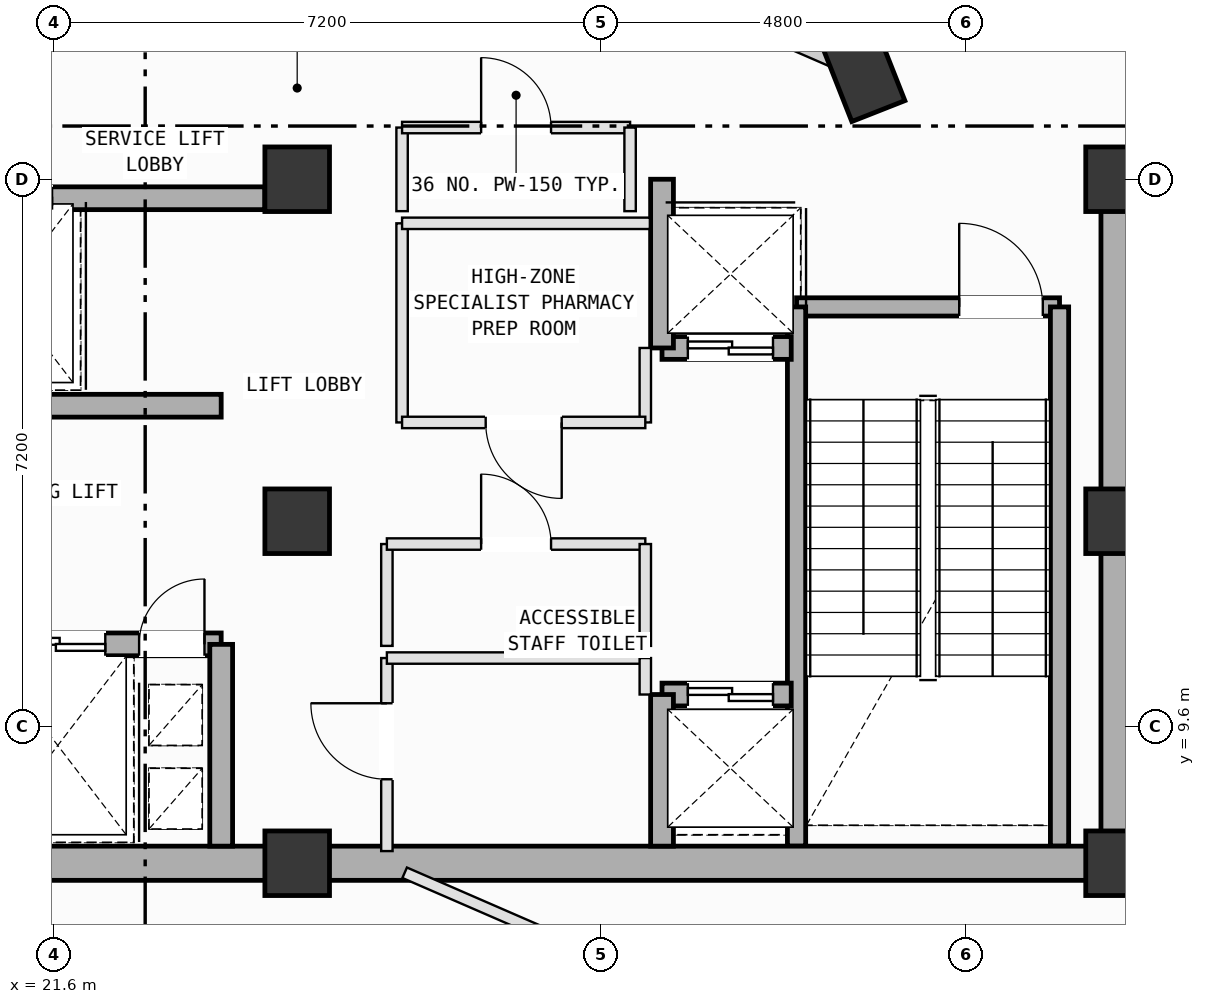
"""IFC4 building model, lengths in metres.
Left out: names, types, materials, properties, quantities, classifications, styles, units other than length and angle.
Written with IfcOpenShell. Run it as: python <this file> out.ifc"""

import sys

from ifc_helpers import new_model, si_unit, direction, frame, frame_2d, origin, origin_2d, place, context, subcontext, project, spatial, rectangle, extrude, element, fill, save


model = new_model("IFC4")
c1 = context("Model", 3, precision=1e-05, world=origin(), true_north=direction((0.0, 1.0)))
c2 = subcontext(c1, "Body", "Model", "MODEL_VIEW")
j1 = project(units=[si_unit("LENGTHUNIT", "METRE"), si_unit("PLANEANGLEUNIT", "RADIAN")], contexts=[c1])
p1 = place(None, origin())
s1 = spatial("IfcSite", under=j1, at=p1, CompositionType="ELEMENT")
p2 = place(p1, origin())
s2 = spatial("IfcBuilding", under=s1, at=p2, CompositionType="ELEMENT")
p3 = place(p2, frame((0.0, 0.0, 333.4)))
s3 = spatial("IfcBuildingStorey", under=s2, at=p3, CompositionType="ELEMENT", Elevation=333.4)
for number, where, z_axis, x_axis in (
    (1, (24.8, 7.8, 0.0), (0.0, 0.0, 1.0), (1.0, 0.0, 0.0)),
    (2, (24.8, 12.3, 0.0), (0.0, 0.0, 1.0), (1.0, 0.0, 0.0)),
    (3, (24.8, 16.8, 0.0), (0.0, 0.0, 1.0), (1.0, 0.0, 0.0)),
    (4, (35.6, 7.8, 0.0), (0.0, 0.0, 1.0), (1.0, 0.0, 0.0)),
    (5, (35.6, 12.3, 0.0), (0.0, 0.0, 1.0), (1.0, 0.0, 0.0)),
    (6, (35.6, 16.8, 0.0), (0.0, 0.0, 1.0), (1.0, 0.0, 0.0)),
):
    element("IfcColumn", number, at=place(p3, frame(where, z_axis=z_axis, x_axis=x_axis)), inside=s3, PredefinedType="COLUMN", context=c2, shape_type="SweptSolid", body=[
        extrude(rectangle(XDim=0.85, YDim=0.85, at=origin_2d()), origin(), (0.0, 0.0, 1.0), 4.8),
    ])
p4 = place(p3, frame((32.226, 18.255, 0.002), z_axis=(0.0, 0.0, 1.0), x_axis=(-0.366501226724, 0.930417567982, 0.0)))
e7 = element("IfcColumn", 7, at=p4, inside=s3, PredefinedType="COLUMN", context=c2, shape_type="SweptSolid", body=[
    extrude(rectangle(XDim=1.2, YDim=0.75, at=origin_2d()), origin(), (0.0, 0.0, 1.0), 4.796),
])
p5 = place(p3, frame((25.484, 21.187, 0.0), z_axis=(0.0, 0.0, 1.0), x_axis=(0.917060568388, -0.398747932794, 0.0)))
e8 = element("IfcWall", 8, at=p5, inside=s3, PredefinedType="SOLIDWALL", context=c2, shape_type="SweptSolid", body=[
    extrude(rectangle(XDim=6.955, YDim=0.28, at=frame_2d((3.478, 0.0))), origin(), (0.0, 0.0, 1.0), 3.485),
])
p6 = place(p3, frame((31.37, 15.12, 0.0), z_axis=(0.0, 0.0, 1.0), x_axis=(1.0, 0.0, 0.0)))
e9 = element("IfcWall", 9, at=p6, inside=s3, PredefinedType="SOLIDWALL", context=c2, shape_type="SweptSolid", body=[
    extrude(rectangle(XDim=3.46, YDim=0.24, at=frame_2d((1.73, 0.0))), origin(), (0.0, 0.0, 1.0), 4.5),
])
p7 = place(p6, frame((2.14, 0.0, 0.0)))
e10 = element("IfcOpeningElement", 10, at=p7, cuts=e9, PredefinedType="OPENING", context=c2, shape_type="SweptSolid", body=[
    extrude(rectangle(XDim=1.1, YDim=2.15, at=frame_2d((0.55, 1.075))), frame((0.0, 0.13, 0.0), z_axis=(0.0, -1.0, 0.0), x_axis=(1.0, 0.0, 0.0)), (0.0, 0.0, 1.0), 0.26),
])
for number, where, z_axis, x_axis in (
    (11, (34.83, 15.12, 0.0), (0.0, 0.0, 1.0), (0.0, -1.0, 0.0)),
    (12, (31.37, 8.025, 0.0), (0.0, 0.0, 1.0), (0.0, 1.0, 0.0)),
):
    element("IfcWall", number, at=place(p3, frame(where, z_axis=z_axis, x_axis=x_axis)), inside=s3, PredefinedType="SOLIDWALL", context=c2, shape_type="SweptSolid", body=[
        extrude(rectangle(XDim=7.095, YDim=0.24, at=frame_2d((3.548, 0.0))), origin(), (0.0, 0.0, 1.0), 4.5),
    ])
for number, where, z_axis, x_axis in (
    (13, (14.0, 7.8, 0.0), (0.0, 0.0, 1.0), (1.0, 0.0, 0.0)),
    (14, (24.8, 7.8, 0.0), (0.0, 0.0, 1.0), (1.0, 0.0, 0.0)),
):
    element("IfcWall", number, at=place(p3, frame(where, z_axis=z_axis, x_axis=x_axis)), inside=s3, PredefinedType="SHEAR", context=c2, shape_type="SweptSolid", body=[
        extrude(rectangle(XDim=10.8, YDim=0.45, at=frame_2d((5.4, 0.0))), origin(), (0.0, 0.0, 1.0), 4.5),
    ])
p8 = place(p3, frame((35.6, 7.8, 0.0), z_axis=(0.0, 0.0, 1.0), x_axis=(0.0, 1.0, 0.0)))
e15 = element("IfcWall", 15, at=p8, inside=s3, PredefinedType="SHEAR", context=c2, shape_type="SweptSolid", body=[
    extrude(rectangle(XDim=9.0, YDim=0.45, at=frame_2d((4.5, 0.0))), origin(), (0.0, 0.0, 1.0), 4.5),
])
p9 = place(p3, frame((19.85, 16.55, 0.0), z_axis=(0.0, 0.0, 1.0), x_axis=(1.0, 0.0, 0.0)))
e16 = element("IfcWall", 16, at=p9, inside=s3, PredefinedType="SOLIDWALL", context=c2, shape_type="SweptSolid", body=[
    extrude(rectangle(XDim=4.525, YDim=0.3, at=frame_2d((2.262, 0.0))), origin(), (0.0, 0.0, 1.0), 4.5),
])
p10 = place(p9, frame((0.475, 0.0, 0.0)))
e17 = element("IfcOpeningElement", 17, at=p10, cuts=e16, PredefinedType="OPENING", context=c2, shape_type="SweptSolid", body=[
    extrude(rectangle(XDim=1.25, YDim=2.18, at=frame_2d((0.625, 1.09))), frame((0.0, 0.16, 0.0), z_axis=(0.0, -1.0, 0.0), x_axis=(1.0, 0.0, 0.0)), (0.0, 0.0, 1.0), 0.32),
])
p11 = place(p3, frame((18.5, 10.68, 0.0), z_axis=(0.0, 0.0, 1.0), x_axis=(1.0, 0.0, 0.0)))
e18 = element("IfcWall", 18, at=p11, inside=s3, PredefinedType="SOLIDWALL", context=c2, shape_type="SweptSolid", body=[
    extrude(rectangle(XDim=5.3, YDim=0.3, at=frame_2d((2.65, 0.0))), origin(), (0.0, 0.0, 1.0), 4.5),
])
p12 = place(p11, frame((4.22, 0.0, 0.0)))
e19 = element("IfcOpeningElement", 19, at=p12, cuts=e18, PredefinedType="OPENING", context=c2, shape_type="SweptSolid", body=[
    extrude(rectangle(XDim=0.86, YDim=2.06, at=frame_2d((0.43, 1.03))), frame((0.0, 0.16, 0.0), z_axis=(0.0, -1.0, 0.0), x_axis=(1.0, 0.0, 0.0)), (0.0, 0.0, 1.0), 0.32),
])
p13 = place(p11, frame((0.425, 0.0, 0.0)))
e20 = element("IfcOpeningElement", 20, at=p13, cuts=e18, PredefinedType="OPENING", context=c2, shape_type="SweptSolid", body=[
    extrude(rectangle(XDim=1.25, YDim=2.18, at=frame_2d((0.625, 1.09))), frame((0.0, 0.16, 0.0), z_axis=(0.0, -1.0, 0.0), x_axis=(1.0, 0.0, 0.0)), (0.0, 0.0, 1.0), 0.32),
])
p14 = place(p11, frame((2.525, 0.0, 0.0)))
e21 = element("IfcOpeningElement", 21, at=p14, cuts=e18, PredefinedType="OPENING", context=c2, shape_type="SweptSolid", body=[
    extrude(rectangle(XDim=1.25, YDim=2.18, at=frame_2d((0.625, 1.09))), frame((0.0, 0.16, 0.0), z_axis=(0.0, -1.0, 0.0), x_axis=(1.0, 0.0, 0.0)), (0.0, 0.0, 1.0), 0.32),
])
p15 = place(p3, frame((18.5, 13.82, 0.0), z_axis=(0.0, 0.0, 1.0), x_axis=(1.0, 0.0, 0.0)))
e22 = element("IfcWall", 22, at=p15, inside=s3, PredefinedType="SOLIDWALL", context=c2, shape_type="SweptSolid", body=[
    extrude(rectangle(XDim=5.3, YDim=0.3, at=frame_2d((2.65, 0.0))), origin(), (0.0, 0.0, 1.0), 4.5),
])
p16 = place(p15, frame((0.18, 0.0, 0.0)))
e23 = element("IfcOpeningElement", 23, at=p16, cuts=e22, PredefinedType="OPENING", context=c2, shape_type="SweptSolid", body=[
    extrude(rectangle(XDim=1.1, YDim=2.15, at=frame_2d((0.55, 1.075))), frame((0.0, 0.16, 0.0), z_axis=(0.0, -1.0, 0.0), x_axis=(1.0, 0.0, 0.0)), (0.0, 0.0, 1.0), 0.32),
])
p17 = place(p3, frame((23.8, 8.025, 0.0), z_axis=(0.0, 0.0, 1.0), x_axis=(0.0, 1.0, 0.0)))
e24 = element("IfcWall", 24, at=p17, inside=s3, PredefinedType="SOLIDWALL", context=c2, shape_type="SweptSolid", body=[
    extrude(rectangle(XDim=2.655, YDim=0.3, at=frame_2d((1.328, 0.0))), origin(), (0.0, 0.0, 1.0), 4.5),
])
p18 = place(p3, frame((29.6, 10.02, 0.0), z_axis=(0.0, 0.0, 1.0), x_axis=(1.0, 0.0, 0.0)))
e25 = element("IfcWall", 25, at=p18, inside=s3, PredefinedType="SOLIDWALL", context=c2, shape_type="SweptSolid", body=[
    extrude(rectangle(XDim=1.7, YDim=0.3, at=frame_2d((0.85, 0.0))), origin(), (0.0, 0.0, 1.0), 4.5),
])
p19 = place(p18, frame((0.34, 0.0, 0.0)))
e26 = element("IfcOpeningElement", 26, at=p19, cuts=e25, PredefinedType="OPENING", context=c2, shape_type="SweptSolid", body=[
    extrude(rectangle(XDim=1.12, YDim=2.15, at=frame_2d((0.56, 1.075))), frame((0.0, 0.16, 0.0), z_axis=(0.0, -1.0, 0.0), x_axis=(1.0, 0.0, 0.0)), (0.0, 0.0, 1.0), 0.32),
])
p20 = place(p3, frame((29.6, 8.025, 0.0), z_axis=(0.0, 0.0, 1.0), x_axis=(0.0, 1.0, 0.0)))
e27 = element("IfcWall", 27, at=p20, inside=s3, PredefinedType="SOLIDWALL", context=c2, shape_type="SweptSolid", body=[
    extrude(rectangle(XDim=1.995, YDim=0.3, at=frame_2d((0.998, 0.0))), origin(), (0.0, 0.0, 1.0), 4.5),
])
p21 = place(p3, frame((29.6, 14.58, 0.0), z_axis=(0.0, 0.0, 1.0), x_axis=(1.0, 0.0, 0.0)))
e28 = element("IfcWall", 28, at=p21, inside=s3, PredefinedType="SOLIDWALL", context=c2, shape_type="SweptSolid", body=[
    extrude(rectangle(XDim=1.7, YDim=0.3, at=frame_2d((0.85, 0.0))), origin(), (0.0, 0.0, 1.0), 4.5),
])
p22 = place(p21, frame((0.34, 0.0, 0.0)))
e29 = element("IfcOpeningElement", 29, at=p22, cuts=e28, PredefinedType="OPENING", context=c2, shape_type="SweptSolid", body=[
    extrude(rectangle(XDim=1.12, YDim=2.15, at=frame_2d((0.56, 1.075))), frame((0.0, 0.16, 0.0), z_axis=(0.0, -1.0, 0.0), x_axis=(1.0, 0.0, 0.0)), (0.0, 0.0, 1.0), 0.32),
])
p23 = place(p3, frame((29.6, 14.58, 0.0), z_axis=(0.0, 0.0, 1.0), x_axis=(0.0, 1.0, 0.0)))
e30 = element("IfcWall", 30, at=p23, inside=s3, PredefinedType="SOLIDWALL", context=c2, shape_type="SweptSolid", body=[
    extrude(rectangle(XDim=2.22, YDim=0.3, at=frame_2d((1.11, 0.0))), origin(), (0.0, 0.0, 1.0), 4.5),
])
p24 = place(p3, frame((25.98, 7.96, 0.0), z_axis=(0.0, 0.0, 1.0), x_axis=(0.0, 1.0, 0.0)))
e31 = element("IfcWall", 31, at=p24, inside=s3, PredefinedType="PARTITIONING", context=c2, shape_type="SweptSolid", body=[
    extrude(rectangle(XDim=2.54, YDim=0.15, at=frame_2d((1.27, 0.0))), origin(), (0.0, 0.0, 1.0), 4.5),
])
p25 = place(p24, frame((0.945, 0.0, 0.0)))
e32 = element("IfcOpeningElement", 32, at=p25, cuts=e31, PredefinedType="OPENING", context=c2, shape_type="SweptSolid", body=[
    extrude(rectangle(XDim=1.0, YDim=2.12, at=frame_2d((0.5, 1.06))), frame((0.0, 0.085, 0.0), z_axis=(0.0, -1.0, 0.0), x_axis=(1.0, 0.0, 0.0)), (0.0, 0.0, 1.0), 0.17),
])
p26 = place(p3, frame((25.98, 10.5, 0.0), z_axis=(0.0, 0.0, 1.0), x_axis=(1.0, 0.0, 0.0)))
e33 = element("IfcWall", 33, at=p26, inside=s3, PredefinedType="PARTITIONING", context=c2, shape_type="SweptSolid", body=[
    extrude(rectangle(XDim=3.4, YDim=0.15, at=frame_2d((1.7, 0.0))), origin(), (0.0, 0.0, 1.0), 4.5),
])
p27 = place(p3, frame((29.38, 10.5, 0.0), z_axis=(0.0, 0.0, 1.0), x_axis=(0.0, -1.0, 0.0)))
e34 = element("IfcWall", 34, at=p27, inside=s3, PredefinedType="PARTITIONING", context=c2, shape_type="SweptSolid", body=[
    extrude(rectangle(XDim=0.48, YDim=0.15, at=frame_2d((0.24, 0.0))), origin(), (0.0, 0.0, 1.0), 4.5),
])
p28 = place(p3, frame((25.98, 10.66, 0.0), z_axis=(0.0, 0.0, 1.0), x_axis=(0.0, 1.0, 0.0)))
e35 = element("IfcWall", 35, at=p28, inside=s3, PredefinedType="PARTITIONING", context=c2, shape_type="SweptSolid", body=[
    extrude(rectangle(XDim=1.34, YDim=0.15, at=frame_2d((0.67, 0.0))), origin(), (0.0, 0.0, 1.0), 4.5),
])
p29 = place(p3, frame((25.98, 12.0, 0.0), z_axis=(0.0, 0.0, 1.0), x_axis=(1.0, 0.0, 0.0)))
e36 = element("IfcWall", 36, at=p29, inside=s3, PredefinedType="PARTITIONING", context=c2, shape_type="SweptSolid", body=[
    extrude(rectangle(XDim=3.4, YDim=0.15, at=frame_2d((1.7, 0.0))), origin(), (0.0, 0.0, 1.0), 4.5),
])
p30 = place(p29, frame((1.24, 0.0, 0.0)))
e37 = element("IfcOpeningElement", 37, at=p30, cuts=e36, PredefinedType="OPENING", context=c2, shape_type="SweptSolid", body=[
    extrude(rectangle(XDim=0.92, YDim=2.1, at=frame_2d((0.46, 1.05))), frame((0.0, 0.085, 0.0), z_axis=(0.0, -1.0, 0.0), x_axis=(1.0, 0.0, 0.0)), (0.0, 0.0, 1.0), 0.17),
])
p31 = place(p3, frame((29.38, 12.0, 0.0), z_axis=(0.0, 0.0, 1.0), x_axis=(0.0, -1.0, 0.0)))
e38 = element("IfcWall", 38, at=p31, inside=s3, PredefinedType="PARTITIONING", context=c2, shape_type="SweptSolid", body=[
    extrude(rectangle(XDim=1.34, YDim=0.15, at=frame_2d((0.67, 0.0))), origin(), (0.0, 0.0, 1.0), 4.5),
])
p32 = place(p3, frame((26.18, 13.6, 0.0), z_axis=(0.0, 0.0, 1.0), x_axis=(0.0, 1.0, 0.0)))
e39 = element("IfcWall", 39, at=p32, inside=s3, PredefinedType="PARTITIONING", context=c2, shape_type="SweptSolid", body=[
    extrude(rectangle(XDim=2.62, YDim=0.15, at=frame_2d((1.31, 0.0))), origin(), (0.0, 0.0, 1.0), 4.5),
])
p33 = place(p3, frame((26.18, 16.22, 0.0), z_axis=(0.0, 0.0, 1.0), x_axis=(1.0, 0.0, 0.0)))
e40 = element("IfcWall", 40, at=p33, inside=s3, PredefinedType="PARTITIONING", context=c2, shape_type="SweptSolid", body=[
    extrude(rectangle(XDim=3.26, YDim=0.15, at=frame_2d((1.63, 0.0))), origin(), (0.0, 0.0, 1.0), 4.5),
])
p34 = place(p3, frame((29.38, 14.58, 0.0), z_axis=(0.0, 0.0, 1.0), x_axis=(0.0, -1.0, 0.0)))
e41 = element("IfcWall", 41, at=p34, inside=s3, PredefinedType="PARTITIONING", context=c2, shape_type="SweptSolid", body=[
    extrude(rectangle(XDim=0.98, YDim=0.15, at=frame_2d((0.49, 0.0))), origin(), (0.0, 0.0, 1.0), 4.5),
])
p35 = place(p3, frame((29.38, 13.6, 0.0), z_axis=(0.0, 0.0, 1.0), x_axis=(-1.0, 0.0, 0.0)))
e42 = element("IfcWall", 42, at=p35, inside=s3, PredefinedType="PARTITIONING", context=c2, shape_type="SweptSolid", body=[
    extrude(rectangle(XDim=3.2, YDim=0.15, at=frame_2d((1.6, 0.0))), origin(), (0.0, 0.0, 1.0), 4.5),
])
p36 = place(p35, frame((1.1, 0.0, 0.0)))
e43 = element("IfcOpeningElement", 43, at=p36, cuts=e42, PredefinedType="OPENING", context=c2, shape_type="SweptSolid", body=[
    extrude(rectangle(XDim=1.0, YDim=2.12, at=frame_2d((0.5, 1.06))), frame((0.0, 0.085, 0.0), z_axis=(0.0, -1.0, 0.0), x_axis=(1.0, 0.0, 0.0)), (0.0, 0.0, 1.0), 0.17),
])
p37 = place(p3, frame((26.18, 16.38, 0.0), z_axis=(0.0, 0.0, 1.0), x_axis=(0.0, 1.0, 0.0)))
e44 = element("IfcWall", 44, at=p37, inside=s3, PredefinedType="PARTITIONING", context=c2, shape_type="SweptSolid", body=[
    extrude(rectangle(XDim=1.1, YDim=0.15, at=frame_2d((0.55, 0.0))), origin(), (0.0, 0.0, 1.0), 4.5),
])
p38 = place(p3, frame((26.18, 17.48, 0.0), z_axis=(0.0, 0.0, 1.0), x_axis=(1.0, 0.0, 0.0)))
e45 = element("IfcWall", 45, at=p38, inside=s3, PredefinedType="PARTITIONING", context=c2, shape_type="SweptSolid", body=[
    extrude(rectangle(XDim=3.0, YDim=0.15, at=frame_2d((1.5, 0.0))), origin(), (0.0, 0.0, 1.0), 4.5),
])
p39 = place(p38, frame((1.04, 0.0, 0.0)))
e46 = element("IfcOpeningElement", 46, at=p39, cuts=e45, PredefinedType="OPENING", context=c2, shape_type="SweptSolid", body=[
    extrude(rectangle(XDim=0.92, YDim=2.1, at=frame_2d((0.46, 1.05))), frame((0.0, 0.085, 0.0), z_axis=(0.0, -1.0, 0.0), x_axis=(1.0, 0.0, 0.0)), (0.0, 0.0, 1.0), 0.17),
])
p40 = place(p3, frame((29.18, 17.48, 0.0), z_axis=(0.0, 0.0, 1.0), x_axis=(0.0, -1.0, 0.0)))
e47 = element("IfcWall", 47, at=p40, inside=s3, PredefinedType="PARTITIONING", context=c2, shape_type="SweptSolid", body=[
    extrude(rectangle(XDim=1.1, YDim=0.15, at=frame_2d((0.55, 0.0))), origin(), (0.0, 0.0, 1.0), 4.5),
])
p41 = place(p3, frame((35.475, -4.367, 0.0), z_axis=(0.0, 0.0, 1.0), x_axis=(0.398727470588, 0.917069465307, 0.0)))
e48 = element("IfcWall", 48, at=p41, inside=s3, PredefinedType="PARTITIONING", context=c2, shape_type="SweptSolid", body=[
    extrude(rectangle(XDim=13.136, YDim=0.15, at=frame_2d((6.568, 0.0))), origin(), (0.0, 0.0, 1.0), 3.485),
])
p42 = place(p41, frame((5.968, 0.0, 0.0)))
e49 = element("IfcOpeningElement", 49, at=p42, cuts=e48, PredefinedType="OPENING", context=c2, shape_type="SweptSolid", body=[
    extrude(rectangle(XDim=1.2, YDim=2.15, at=frame_2d((0.6, 1.075))), frame((0.0, 0.085, 0.0), z_axis=(0.0, -1.0, 0.0), x_axis=(1.0, 0.0, 0.0)), (0.0, 0.0, 1.0), 0.17),
])
p43 = place(p3, frame((26.214, 7.675, 0.0), z_axis=(0.0, 0.0, 1.0), x_axis=(0.91704872202, -0.398775176561, 0.0)))
e50 = element("IfcWall", 50, at=p43, inside=s3, PredefinedType="PARTITIONING", context=c2, shape_type="SweptSolid", body=[
    extrude(rectangle(XDim=9.825, YDim=0.15, at=frame_2d((4.913, 0.0))), origin(), (0.0, 0.0, 1.0), 4.5),
])
p44 = place(p43, frame((7.74, 0.0, 0.0)))
e51 = element("IfcOpeningElement", 51, at=p44, cuts=e50, PredefinedType="OPENING", context=c2, shape_type="SweptSolid", body=[
    extrude(rectangle(XDim=1.2, YDim=2.15, at=frame_2d((0.6, 1.075))), frame((0.0, 0.085, 0.0), z_axis=(0.0, -1.0, 0.0), x_axis=(1.0, 0.0, 0.0)), (0.0, 0.0, 1.0), 0.17),
])
p45 = place(p3, frame((32.403, -3.031, 0.0), z_axis=(0.0, 0.0, 1.0), x_axis=(-0.917060874319, 0.398747229197, 0.0)))
e52 = element("IfcWall", 52, at=p45, inside=s3, PredefinedType="PARTITIONING", context=c2, shape_type="SweptSolid", body=[
    extrude(rectangle(XDim=27.055, YDim=0.15, at=frame_2d((13.527, 0.0))), origin(), (0.0, 0.0, 1.0), 4.5),
])
p46 = place(p7, origin())
e53 = element("IfcDoor", 53, at=p46, inside=s3, OperationType="SINGLE_SWING_LEFT", PredefinedType="DOOR", context=c2, shape_type="SweptSolid", body=[
    extrude(rectangle(XDim=1.1, YDim=2.15, at=frame_2d((0.55, 1.075))), frame((0.0, 0.025, 0.0), z_axis=(0.0, -1.0, 0.0), x_axis=(1.0, 0.0, 0.0)), (0.0, 0.0, 1.0), 0.05),
])
fill(e10, e53)
p47 = place(p12, origin())
e54 = element("IfcDoor", 54, at=p47, inside=s3, OperationType="SINGLE_SWING_RIGHT", PredefinedType="DOOR", context=c2, shape_type="SweptSolid", body=[
    extrude(rectangle(XDim=0.86, YDim=2.06, at=frame_2d((0.43, 1.03))), frame((0.0, 0.025, 0.0), z_axis=(0.0, -1.0, 0.0), x_axis=(1.0, 0.0, 0.0)), (0.0, 0.0, 1.0), 0.05),
])
fill(e19, e54)
p48 = place(p14, origin())
e55 = element("IfcDoor", 55, at=p48, inside=s3, OperationType="DOUBLE_DOOR_SLIDING", PredefinedType="DOOR", context=c2, shape_type="SweptSolid", body=[
    extrude(rectangle(XDim=1.25, YDim=2.18, at=frame_2d((0.625, 1.09))), frame((0.0, 0.025, 0.0), z_axis=(0.0, -1.0, 0.0), x_axis=(1.0, 0.0, 0.0)), (0.0, 0.0, 1.0), 0.05),
])
fill(e21, e55)
p49 = place(p19, origin())
e56 = element("IfcDoor", 56, at=p49, inside=s3, OperationType="DOUBLE_DOOR_SLIDING", PredefinedType="DOOR", context=c2, shape_type="SweptSolid", body=[
    extrude(rectangle(XDim=1.12, YDim=2.15, at=frame_2d((0.56, 1.075))), frame((0.0, 0.025, 0.0), z_axis=(0.0, -1.0, 0.0), x_axis=(1.0, 0.0, 0.0)), (0.0, 0.0, 1.0), 0.05),
])
fill(e26, e56)
p50 = place(p22, origin())
e57 = element("IfcDoor", 57, at=p50, inside=s3, OperationType="DOUBLE_DOOR_SLIDING", PredefinedType="DOOR", context=c2, shape_type="SweptSolid", body=[
    extrude(rectangle(XDim=1.12, YDim=2.15, at=frame_2d((0.56, 1.075))), frame((0.0, 0.025, 0.0), z_axis=(0.0, -1.0, 0.0), x_axis=(1.0, 0.0, 0.0)), (0.0, 0.0, 1.0), 0.05),
])
fill(e29, e57)
p51 = place(p25, origin())
e58 = element("IfcDoor", 58, at=p51, inside=s3, OperationType="SINGLE_SWING_RIGHT", PredefinedType="DOOR", context=c2, shape_type="SweptSolid", body=[
    extrude(rectangle(XDim=1.0, YDim=2.12, at=frame_2d((0.5, 1.06))), frame((0.0, 0.025, 0.0), z_axis=(0.0, -1.0, 0.0), x_axis=(1.0, 0.0, 0.0)), (0.0, 0.0, 1.0), 0.05),
])
fill(e32, e58)
p52 = place(p30, origin())
e59 = element("IfcDoor", 59, at=p52, inside=s3, OperationType="SINGLE_SWING_LEFT", PredefinedType="DOOR", context=c2, shape_type="SweptSolid", body=[
    extrude(rectangle(XDim=0.92, YDim=2.1, at=frame_2d((0.46, 1.05))), frame((0.0, 0.025, 0.0), z_axis=(0.0, -1.0, 0.0), x_axis=(1.0, 0.0, 0.0)), (0.0, 0.0, 1.0), 0.05),
])
fill(e37, e59)
p53 = place(p36, origin())
e60 = element("IfcDoor", 60, at=p53, inside=s3, OperationType="SINGLE_SWING_LEFT", PredefinedType="DOOR", context=c2, shape_type="SweptSolid", body=[
    extrude(rectangle(XDim=1.0, YDim=2.12, at=frame_2d((0.5, 1.06))), frame((0.0, 0.025, 0.0), z_axis=(0.0, -1.0, 0.0), x_axis=(1.0, 0.0, 0.0)), (0.0, 0.0, 1.0), 0.05),
])
fill(e43, e60)
p54 = place(p39, origin())
e61 = element("IfcDoor", 61, at=p54, inside=s3, OperationType="SINGLE_SWING_LEFT", PredefinedType="DOOR", context=c2, shape_type="SweptSolid", body=[
    extrude(rectangle(XDim=0.92, YDim=2.1, at=frame_2d((0.46, 1.05))), frame((0.0, 0.025, 0.0), z_axis=(0.0, -1.0, 0.0), x_axis=(1.0, 0.0, 0.0)), (0.0, 0.0, 1.0), 0.05),
])
fill(e46, e61)
save(model, sys.argv[1])
